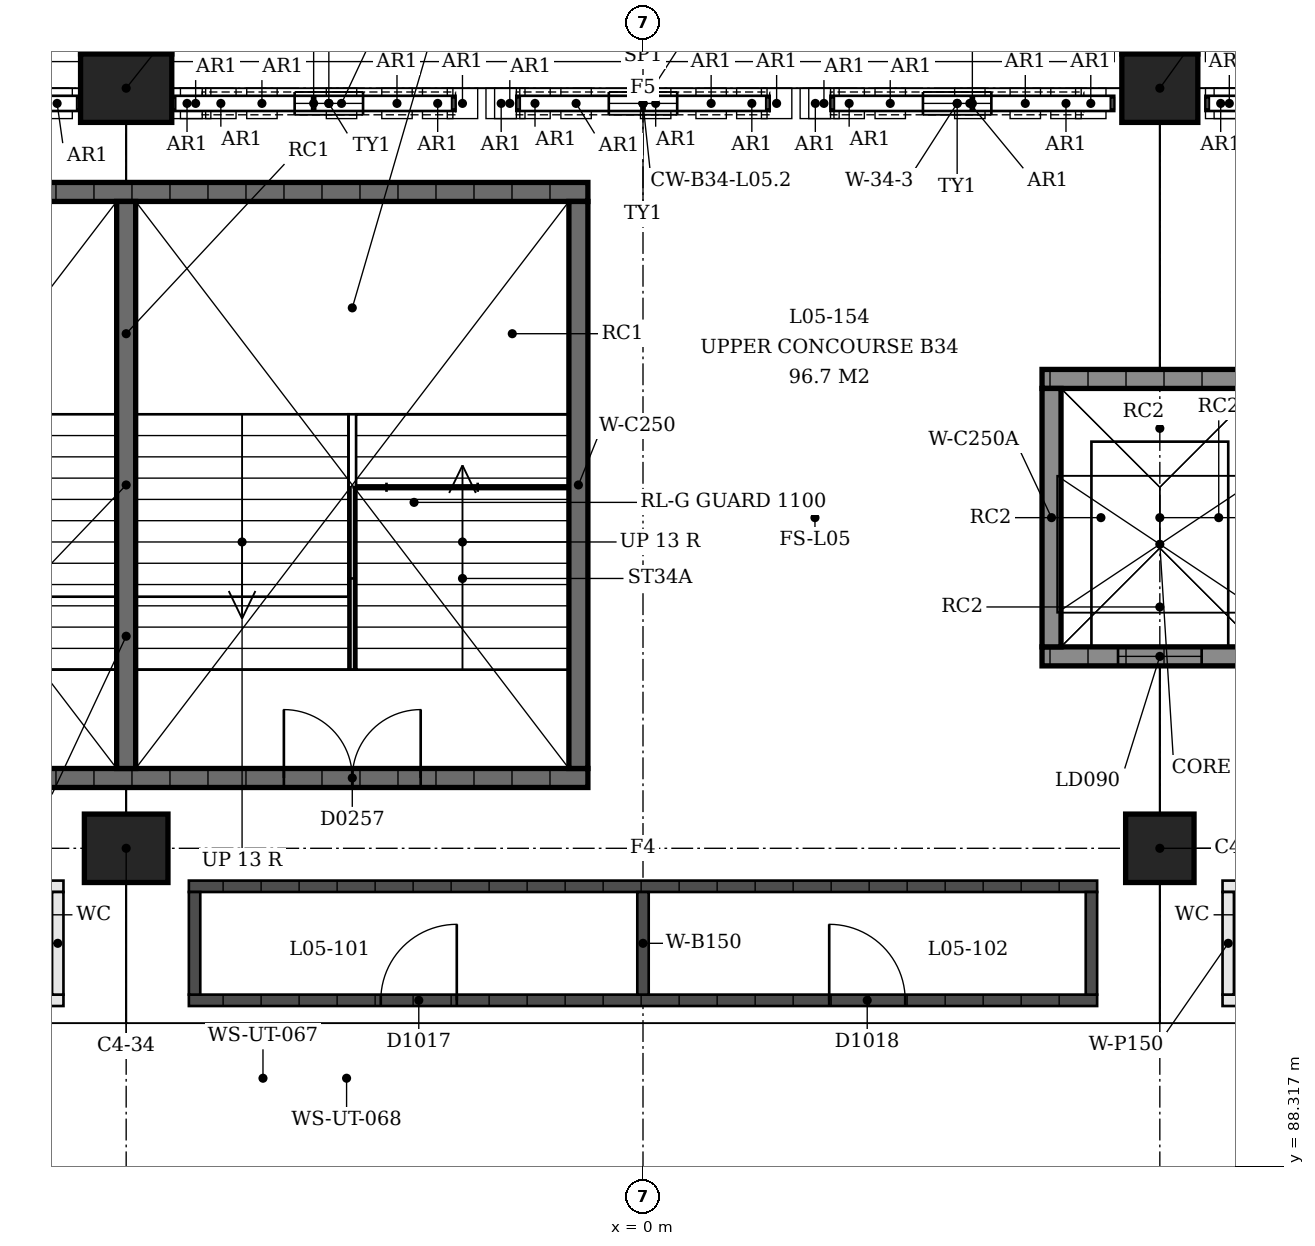
"""IFC4 building model, lengths in metres.
Left out: names, types, materials, properties, quantities, classifications, styles, units other than length and angle.
Written with IfcOpenShell. Run it as: python <this file> out.ifc"""

import sys

from ifc_helpers import new_model, si_unit, direction, frame, frame_2d, origin, origin_2d, place, context, subcontext, project, spatial, polyline, rectangle, outline, extrude, element, fill, save


model = new_model("IFC4")
c1 = context("Model", 3, precision=1e-05, world=origin(), true_north=direction((0.0, 1.0)))
c2 = subcontext(c1, "Body", "Model", "MODEL_VIEW")
j1 = project(units=[si_unit("LENGTHUNIT", "METRE"), si_unit("PLANEANGLEUNIT", "RADIAN")], contexts=[c1])
p1 = place(None, origin())
s1 = spatial("IfcSite", under=j1, at=p1, CompositionType="ELEMENT")
p2 = place(p1, origin())
s2 = spatial("IfcBuilding", under=s1, at=p2, CompositionType="ELEMENT")
p3 = place(p2, frame((0.0, 0.0, 22.5)))
s3 = spatial("IfcBuildingStorey", under=s2, at=p3, CompositionType="ELEMENT", Elevation=22.5)
p4 = place(p3, frame((-6.8, 92.5, 0.0), z_axis=(0.0, 0.0, 1.0), x_axis=(-1.0, 0.0, 0.0)))
e1 = element("IfcColumn", 1, at=p4, inside=s3, PredefinedType="COLUMN", context=c2, shape_type="SweptSolid", body=[
    extrude(rectangle(XDim=1.1, YDim=0.9, at=origin_2d()), origin(), (0.0, 0.0, 1.0), 6.5),
])
p5 = place(p3, frame((-6.8, 102.5, 0.0), z_axis=(0.0, 0.0, 1.0), x_axis=(-1.0, 0.0, 0.0)))
e2 = element("IfcColumn", 2, at=p5, inside=s3, PredefinedType="COLUMN", context=c2, shape_type="SweptSolid", body=[
    extrude(rectangle(XDim=1.2, YDim=0.9, at=origin_2d()), origin(), (0.0, 0.0, 1.0), 6.5),
])
p6 = place(p3, frame((6.8, 92.5, 0.0), z_axis=(0.0, 0.0, 1.0), x_axis=(-1.0, 0.0, 0.0)))
e3 = element("IfcColumn", 3, at=p6, inside=s3, PredefinedType="COLUMN", context=c2, shape_type="SweptSolid", body=[
    extrude(rectangle(XDim=0.9, YDim=0.9, at=origin_2d()), origin(), (0.0, 0.0, 1.0), 6.5),
])
p7 = place(p3, frame((6.8, 102.5, 0.0), z_axis=(0.0, 0.0, 1.0), x_axis=(-1.0, 0.0, 0.0)))
e4 = element("IfcColumn", 4, at=p7, inside=s3, PredefinedType="COLUMN", context=c2, shape_type="SweptSolid", body=[
    extrude(rectangle(XDim=1.0, YDim=0.9, at=origin_2d()), origin(), (0.0, 0.0, 1.0), 6.5),
])
p8 = place(p3, frame((-5.8, 102.3, 4.1), z_axis=(0.0, 0.0, 1.0), x_axis=(1.0, 0.0, 0.0)))
e5 = element("IfcWall", 5, at=p8, inside=s3, PredefinedType="SOLIDWALL", context=c2, shape_type="SweptSolid", body=[
    extrude(outline(polyline([(0.0, 0.0), (3.333, 0.0), (3.333, 0.05), (3.225, 1.288), (2.905, 2.541), (2.38, 3.722), (1.667, 4.8), (0.953, 3.722), (0.428, 2.541), (0.108, 1.288), (0.0, 0.05), (0.0, 0.0)])), frame((0.0, 0.15, 0.0), z_axis=(0.0, -1.0, 0.0), x_axis=(1.0, 0.0, 0.0)), (0.0, 0.0, 1.0), 0.3),
])
p9 = place(p8, frame((1.217, 0.0, 0.4)))
e6 = element("IfcOpeningElement", 6, at=p9, cuts=e5, PredefinedType="OPENING", context=c2, shape_type="SweptSolid", body=[
    extrude(rectangle(XDim=0.9, YDim=3.6, at=frame_2d((0.45, 1.8))), frame((0.0, 0.16, 0.0), z_axis=(0.0, -1.0, 0.0), x_axis=(1.0, 0.0, 0.0)), (0.0, 0.0, 1.0), 0.32),
])
p10 = place(p3, frame((-1.667, 102.3, 4.1), z_axis=(0.0, 0.0, 1.0), x_axis=(1.0, 0.0, 0.0)))
e7 = element("IfcWall", 7, at=p10, inside=s3, PredefinedType="SOLIDWALL", context=c2, shape_type="SweptSolid", body=[
    extrude(outline(polyline([(0.0, 0.0), (3.333, 0.0), (3.333, 0.05), (3.225, 1.288), (2.905, 2.541), (2.38, 3.722), (1.667, 4.8), (0.953, 3.722), (0.428, 2.541), (0.108, 1.288), (0.0, 0.05), (0.0, 0.0)])), frame((0.0, 0.15, 0.0), z_axis=(0.0, -1.0, 0.0), x_axis=(1.0, 0.0, 0.0)), (0.0, 0.0, 1.0), 0.3),
])
p11 = place(p10, frame((1.217, 0.0, 0.4)))
e8 = element("IfcOpeningElement", 8, at=p11, cuts=e7, PredefinedType="OPENING", context=c2, shape_type="SweptSolid", body=[
    extrude(rectangle(XDim=0.9, YDim=3.6, at=frame_2d((0.45, 1.8))), frame((0.0, 0.16, 0.0), z_axis=(0.0, -1.0, 0.0), x_axis=(1.0, 0.0, 0.0)), (0.0, 0.0, 1.0), 0.32),
])
p12 = place(p3, frame((2.467, 102.3, 4.1), z_axis=(0.0, 0.0, 1.0), x_axis=(1.0, 0.0, 0.0)))
e9 = element("IfcWall", 9, at=p12, inside=s3, PredefinedType="SOLIDWALL", context=c2, shape_type="SweptSolid", body=[
    extrude(outline(polyline([(0.0, 0.0), (3.333, 0.0), (3.333, 0.05), (3.225, 1.288), (2.905, 2.541), (2.38, 3.722), (1.667, 4.8), (0.953, 3.722), (0.428, 2.541), (0.108, 1.288), (0.0, 0.05), (0.0, 0.0)])), frame((0.0, 0.15, 0.0), z_axis=(0.0, -1.0, 0.0), x_axis=(1.0, 0.0, 0.0)), (0.0, 0.0, 1.0), 0.3),
])
p13 = place(p12, frame((1.217, 0.0, 0.4)))
e10 = element("IfcOpeningElement", 10, at=p13, cuts=e9, PredefinedType="OPENING", context=c2, shape_type="SweptSolid", body=[
    extrude(rectangle(XDim=0.9, YDim=3.6, at=frame_2d((0.45, 1.8))), frame((0.0, 0.16, 0.0), z_axis=(0.0, -1.0, 0.0), x_axis=(1.0, 0.0, 0.0)), (0.0, 0.0, 1.0), 0.32),
])
p14 = place(p3, frame((-0.725, 93.425, 0.0), z_axis=(0.0, 0.0, 1.0), x_axis=(-1.0, 0.0, 0.0)))
e11 = element("IfcWall", 11, at=p14, inside=s3, PredefinedType="SHEAR", context=c2, shape_type="SweptSolid", body=[
    extrude(rectangle(XDim=12.15, YDim=0.25, at=frame_2d((6.075, 0.0))), origin(), (0.0, 0.0, 1.0), 2.1),
])
p15 = place(p14, frame((2.2, 0.0, 0.0)))
e12 = element("IfcOpeningElement", 12, at=p15, cuts=e11, PredefinedType="OPENING", context=c2, shape_type="SweptSolid", body=[
    extrude(rectangle(XDim=1.8, YDim=2.1, at=frame_2d((0.9, 1.05))), frame((0.0, 0.125, 0.0), z_axis=(0.0, -1.0, 0.0), x_axis=(1.0, 0.0, 0.0)), (0.0, 0.0, 1.0), 0.25),
])
p16 = place(p14, frame((8.15, 0.0, 0.0)))
e13 = element("IfcOpeningElement", 13, at=p16, cuts=e11, PredefinedType="OPENING", context=c2, shape_type="SweptSolid", body=[
    extrude(rectangle(XDim=1.8, YDim=2.1, at=frame_2d((0.9, 1.05))), frame((0.0, 0.125, 0.0), z_axis=(0.0, -1.0, 0.0), x_axis=(1.0, 0.0, 0.0)), (0.0, 0.0, 1.0), 0.25),
])
p17 = place(p3, frame((-0.725, 101.135, 0.0), z_axis=(0.0, 0.0, 1.0), x_axis=(-1.0, 0.0, 0.0)))
e14 = element("IfcWall", 14, at=p17, inside=s3, PredefinedType="SHEAR", context=c2, shape_type="SweptSolid", body=[
    extrude(rectangle(XDim=12.15, YDim=0.25, at=frame_2d((6.075, 0.0))), origin(), (0.0, 0.0, 1.0), 2.1),
])
for number, where, z_axis, x_axis in (
    (15, (-0.85, 93.55, 0.0), (0.0, 0.0, 1.0), (0.0, 1.0, 0.0)),
    (16, (-6.8, 93.55, 0.0), (0.0, 0.0, 1.0), (0.0, 1.0, 0.0)),
):
    element("IfcWall", number, at=place(p3, frame(where, z_axis=z_axis, x_axis=x_axis)), inside=s3, PredefinedType="SHEAR", context=c2, shape_type="SweptSolid", body=[
        extrude(rectangle(XDim=7.46, YDim=0.25, at=frame_2d((3.73, 0.0))), origin(), (0.0, 0.0, 1.0), 2.1),
    ])
p18 = place(p3, frame((8.35, 95.025, 0.0), z_axis=(0.0, 0.0, 1.0), x_axis=(-1.0, 0.0, 0.0)))
e17 = element("IfcWall", 17, at=p18, inside=s3, PredefinedType="SHEAR", context=c2, shape_type="SweptSolid", body=[
    extrude(rectangle(XDim=3.1, YDim=0.25, at=frame_2d((1.55, 0.0))), origin(), (0.0, 0.0, 1.0), 3.4),
])
p19 = place(p18, frame((1.0, 0.0, 0.0)))
e18 = element("IfcOpeningElement", 18, at=p19, cuts=e17, PredefinedType="OPENING", context=c2, shape_type="SweptSolid", body=[
    extrude(rectangle(XDim=1.1, YDim=2.1, at=frame_2d((0.55, 1.05))), frame((0.0, 0.125, 0.0), z_axis=(0.0, -1.0, 0.0), x_axis=(1.0, 0.0, 0.0)), (0.0, 0.0, 1.0), 0.25),
])
p20 = place(p3, frame((8.35, 98.675, 0.0), z_axis=(0.0, 0.0, 1.0), x_axis=(-1.0, 0.0, 0.0)))
e19 = element("IfcWall", 19, at=p20, inside=s3, PredefinedType="SHEAR", context=c2, shape_type="SweptSolid", body=[
    extrude(rectangle(XDim=3.1, YDim=0.25, at=frame_2d((1.55, 0.0))), origin(), (0.0, 0.0, 1.0), 3.4),
])
p21 = place(p3, frame((5.375, 95.15, 0.0), z_axis=(0.0, 0.0, 1.0), x_axis=(0.0, 1.0, 0.0)))
e20 = element("IfcWall", 20, at=p21, inside=s3, PredefinedType="SHEAR", context=c2, shape_type="SweptSolid", body=[
    extrude(rectangle(XDim=3.4, YDim=0.25, at=frame_2d((1.7, 0.0))), origin(), (0.0, 0.0, 1.0), 3.4),
])
p22 = place(p3, frame((-7.625, 90.5, 0.0), z_axis=(0.0, 0.0, 1.0), x_axis=(-1.0, 0.0, 0.0)))
e21 = element("IfcWall", 21, at=p22, inside=s3, PredefinedType="PARTITIONING", context=c2, shape_type="SweptSolid", body=[
    extrude(rectangle(XDim=11.95, YDim=0.15, at=frame_2d((5.975, 0.0))), origin(), (0.0, 0.0, 1.0), 3.0),
])
p23 = place(p22, frame((1.454, 0.0, 0.0)))
e22 = element("IfcOpeningElement", 22, at=p23, cuts=e21, PredefinedType="OPENING", context=c2, shape_type="SweptSolid", body=[
    extrude(rectangle(XDim=0.9, YDim=2.1, at=frame_2d((0.45, 1.05))), frame((0.0, 0.075, 0.0), z_axis=(0.0, -1.0, 0.0), x_axis=(1.0, 0.0, 0.0)), (0.0, 0.0, 1.0), 0.15),
])
p24 = place(p22, frame((5.112, 0.0, 0.0)))
e23 = element("IfcOpeningElement", 23, at=p24, cuts=e21, PredefinedType="OPENING", context=c2, shape_type="SweptSolid", body=[
    extrude(rectangle(XDim=0.9, YDim=2.1, at=frame_2d((0.45, 1.05))), frame((0.0, 0.075, 0.0), z_axis=(0.0, -1.0, 0.0), x_axis=(1.0, 0.0, 0.0)), (0.0, 0.0, 1.0), 0.15),
])
p25 = place(p22, frame((7.962, 0.0, 0.0)))
e24 = element("IfcOpeningElement", 24, at=p25, cuts=e21, PredefinedType="OPENING", context=c2, shape_type="SweptSolid", body=[
    extrude(rectangle(XDim=1.1, YDim=2.1, at=frame_2d((0.55, 1.05))), frame((0.0, 0.075, 0.0), z_axis=(0.0, -1.0, 0.0), x_axis=(1.0, 0.0, 0.0)), (0.0, 0.0, 1.0), 0.15),
])
p26 = place(p22, frame((10.204, 0.0, 0.0)))
e25 = element("IfcOpeningElement", 25, at=p26, cuts=e21, PredefinedType="OPENING", context=c2, shape_type="SweptSolid", body=[
    extrude(rectangle(XDim=1.1, YDim=2.1, at=frame_2d((0.55, 1.05))), frame((0.0, 0.075, 0.0), z_axis=(0.0, -1.0, 0.0), x_axis=(1.0, 0.0, 0.0)), (0.0, 0.0, 1.0), 0.15),
])
p27 = place(p3, frame((-7.625, 92.0, 0.0), z_axis=(0.0, 0.0, 1.0), x_axis=(-1.0, 0.0, 0.0)))
e26 = element("IfcWall", 26, at=p27, inside=s3, PredefinedType="PARTITIONING", context=c2, shape_type="SweptSolid", body=[
    extrude(rectangle(XDim=11.95, YDim=0.15, at=frame_2d((5.975, 0.0))), origin(), (0.0, 0.0, 1.0), 3.0),
])
p28 = place(p3, frame((-7.7, 90.575, 0.0), z_axis=(0.0, 0.0, 1.0), x_axis=(0.0, 1.0, 0.0)))
e27 = element("IfcWall", 27, at=p28, inside=s3, PredefinedType="PARTITIONING", context=c2, shape_type="SweptSolid", body=[
    extrude(rectangle(XDim=1.35, YDim=0.15, at=frame_2d((0.675, 0.0))), origin(), (0.0, 0.0, 1.0), 3.0),
])
p29 = place(p3, frame((-5.975, 90.5, 0.0), z_axis=(0.0, 0.0, 1.0), x_axis=(1.0, 0.0, 0.0)))
e28 = element("IfcWall", 28, at=p29, inside=s3, PredefinedType="SOLIDWALL", context=c2, shape_type="SweptSolid", body=[
    extrude(rectangle(XDim=11.95, YDim=0.15, at=frame_2d((5.975, 0.0))), origin(), (0.0, 0.0, 1.0), 3.0),
])
p30 = place(p29, frame((2.525, 0.0, 0.0)))
e29 = element("IfcOpeningElement", 29, at=p30, cuts=e28, PredefinedType="OPENING", context=c2, shape_type="SweptSolid", body=[
    extrude(rectangle(XDim=1.0, YDim=2.1, at=frame_2d((0.5, 1.05))), frame((0.0, 0.075, 0.0), z_axis=(0.0, -1.0, 0.0), x_axis=(1.0, 0.0, 0.0)), (0.0, 0.0, 1.0), 0.15),
])
p31 = place(p29, frame((8.425, 0.0, 0.0)))
e30 = element("IfcOpeningElement", 30, at=p31, cuts=e28, PredefinedType="OPENING", context=c2, shape_type="SweptSolid", body=[
    extrude(rectangle(XDim=1.0, YDim=2.1, at=frame_2d((0.5, 1.05))), frame((0.0, 0.075, 0.0), z_axis=(0.0, -1.0, 0.0), x_axis=(1.0, 0.0, 0.0)), (0.0, 0.0, 1.0), 0.15),
])
p32 = place(p3, frame((-5.975, 92.0, 0.0), z_axis=(0.0, 0.0, 1.0), x_axis=(1.0, 0.0, 0.0)))
e31 = element("IfcWall", 31, at=p32, inside=s3, PredefinedType="SOLIDWALL", context=c2, shape_type="SweptSolid", body=[
    extrude(rectangle(XDim=11.95, YDim=0.15, at=frame_2d((5.975, 0.0))), origin(), (0.0, 0.0, 1.0), 3.0),
])
for number, where, z_axis, x_axis in (
    (32, (-5.9, 90.575, 0.0), (0.0, 0.0, 1.0), (0.0, 1.0, 0.0)),
    (33, (0.0, 90.575, 0.0), (0.0, 0.0, 1.0), (0.0, 1.0, 0.0)),
    (34, (5.9, 90.575, 0.0), (0.0, 0.0, 1.0), (0.0, 1.0, 0.0)),
):
    element("IfcWall", number, at=place(p3, frame(where, z_axis=z_axis, x_axis=x_axis)), inside=s3, PredefinedType="SOLIDWALL", context=c2, shape_type="SweptSolid", body=[
        extrude(rectangle(XDim=1.35, YDim=0.15, at=frame_2d((0.675, 0.0))), origin(), (0.0, 0.0, 1.0), 3.0),
    ])
p33 = place(p3, frame((19.575, 90.5, 0.0), z_axis=(0.0, 0.0, 1.0), x_axis=(-1.0, 0.0, 0.0)))
e35 = element("IfcWall", 35, at=p33, inside=s3, PredefinedType="PARTITIONING", context=c2, shape_type="SweptSolid", body=[
    extrude(rectangle(XDim=11.95, YDim=0.15, at=frame_2d((5.975, 0.0))), origin(), (0.0, 0.0, 1.0), 3.0),
])
p34 = place(p33, frame((1.454, 0.0, 0.0)))
e36 = element("IfcOpeningElement", 36, at=p34, cuts=e35, PredefinedType="OPENING", context=c2, shape_type="SweptSolid", body=[
    extrude(rectangle(XDim=0.9, YDim=2.1, at=frame_2d((0.45, 1.05))), frame((0.0, 0.075, 0.0), z_axis=(0.0, -1.0, 0.0), x_axis=(1.0, 0.0, 0.0)), (0.0, 0.0, 1.0), 0.15),
])
p35 = place(p33, frame((5.112, 0.0, 0.0)))
e37 = element("IfcOpeningElement", 37, at=p35, cuts=e35, PredefinedType="OPENING", context=c2, shape_type="SweptSolid", body=[
    extrude(rectangle(XDim=0.9, YDim=2.1, at=frame_2d((0.45, 1.05))), frame((0.0, 0.075, 0.0), z_axis=(0.0, -1.0, 0.0), x_axis=(1.0, 0.0, 0.0)), (0.0, 0.0, 1.0), 0.15),
])
p36 = place(p33, frame((7.962, 0.0, 0.0)))
e38 = element("IfcOpeningElement", 38, at=p36, cuts=e35, PredefinedType="OPENING", context=c2, shape_type="SweptSolid", body=[
    extrude(rectangle(XDim=1.1, YDim=2.1, at=frame_2d((0.55, 1.05))), frame((0.0, 0.075, 0.0), z_axis=(0.0, -1.0, 0.0), x_axis=(1.0, 0.0, 0.0)), (0.0, 0.0, 1.0), 0.15),
])
p37 = place(p33, frame((10.204, 0.0, 0.0)))
e39 = element("IfcOpeningElement", 39, at=p37, cuts=e35, PredefinedType="OPENING", context=c2, shape_type="SweptSolid", body=[
    extrude(rectangle(XDim=1.1, YDim=2.1, at=frame_2d((0.55, 1.05))), frame((0.0, 0.075, 0.0), z_axis=(0.0, -1.0, 0.0), x_axis=(1.0, 0.0, 0.0)), (0.0, 0.0, 1.0), 0.15),
])
p38 = place(p3, frame((19.575, 92.0, 0.0), z_axis=(0.0, 0.0, 1.0), x_axis=(-1.0, 0.0, 0.0)))
e40 = element("IfcWall", 40, at=p38, inside=s3, PredefinedType="PARTITIONING", context=c2, shape_type="SweptSolid", body=[
    extrude(rectangle(XDim=11.95, YDim=0.15, at=frame_2d((5.975, 0.0))), origin(), (0.0, 0.0, 1.0), 3.0),
])
p39 = place(p3, frame((7.7, 90.575, 0.0), z_axis=(0.0, 0.0, 1.0), x_axis=(0.0, 1.0, 0.0)))
e41 = element("IfcWall", 41, at=p39, inside=s3, PredefinedType="PARTITIONING", context=c2, shape_type="SweptSolid", body=[
    extrude(rectangle(XDim=1.35, YDim=0.15, at=frame_2d((0.675, 0.0))), origin(), (0.0, 0.0, 1.0), 3.0),
])
p40 = place(p9, origin())
e42 = element("IfcWindow", 42, at=p40, inside=s3, PartitioningType="SINGLE_PANEL", PredefinedType="WINDOW", context=c2, shape_type="SweptSolid", body=[
    extrude(rectangle(XDim=0.9, YDim=3.6, at=frame_2d((0.45, 1.8))), frame((0.0, 0.03, 0.0), z_axis=(0.0, -1.0, 0.0), x_axis=(1.0, 0.0, 0.0)), (0.0, 0.0, 1.0), 0.06),
])
fill(e6, e42)
p41 = place(p11, origin())
e43 = element("IfcWindow", 43, at=p41, inside=s3, PartitioningType="SINGLE_PANEL", PredefinedType="WINDOW", context=c2, shape_type="SweptSolid", body=[
    extrude(rectangle(XDim=0.9, YDim=3.6, at=frame_2d((0.45, 1.8))), frame((0.0, 0.03, 0.0), z_axis=(0.0, -1.0, 0.0), x_axis=(1.0, 0.0, 0.0)), (0.0, 0.0, 1.0), 0.06),
])
fill(e8, e43)
p42 = place(p13, origin())
e44 = element("IfcWindow", 44, at=p42, inside=s3, PartitioningType="SINGLE_PANEL", PredefinedType="WINDOW", context=c2, shape_type="SweptSolid", body=[
    extrude(rectangle(XDim=0.9, YDim=3.6, at=frame_2d((0.45, 1.8))), frame((0.0, 0.03, 0.0), z_axis=(0.0, -1.0, 0.0), x_axis=(1.0, 0.0, 0.0)), (0.0, 0.0, 1.0), 0.06),
])
fill(e10, e44)
p43 = place(p15, origin())
e45 = element("IfcDoor", 45, at=p43, inside=s3, OperationType="DOUBLE_DOOR_SINGLE_SWING", PredefinedType="DOOR", context=c2, shape_type="SweptSolid", body=[
    extrude(rectangle(XDim=1.8, YDim=2.1, at=frame_2d((0.9, 1.05))), frame((0.0, 0.025, 0.0), z_axis=(0.0, -1.0, 0.0), x_axis=(1.0, 0.0, 0.0)), (0.0, 0.0, 1.0), 0.05),
])
fill(e12, e45)
p44 = place(p19, origin())
e46 = element("IfcDoor", 46, at=p44, inside=s3, OperationType="SLIDING_TO_LEFT", PredefinedType="DOOR", context=c2, shape_type="SweptSolid", body=[
    extrude(rectangle(XDim=1.1, YDim=2.1, at=frame_2d((0.55, 1.05))), frame((0.0, 0.025, 0.0), z_axis=(0.0, -1.0, 0.0), x_axis=(1.0, 0.0, 0.0)), (0.0, 0.0, 1.0), 0.05),
])
fill(e18, e46)
p45 = place(p30, origin())
e47 = element("IfcDoor", 47, at=p45, inside=s3, OperationType="SINGLE_SWING_LEFT", PredefinedType="DOOR", context=c2, shape_type="SweptSolid", body=[
    extrude(rectangle(XDim=1.0, YDim=2.1, at=frame_2d((0.5, 1.05))), frame((0.0, 0.025, 0.0), z_axis=(0.0, -1.0, 0.0), x_axis=(1.0, 0.0, 0.0)), (0.0, 0.0, 1.0), 0.05),
])
fill(e29, e47)
p46 = place(p31, origin())
e48 = element("IfcDoor", 48, at=p46, inside=s3, OperationType="SINGLE_SWING_RIGHT", PredefinedType="DOOR", context=c2, shape_type="SweptSolid", body=[
    extrude(rectangle(XDim=1.0, YDim=2.1, at=frame_2d((0.5, 1.05))), frame((0.0, 0.025, 0.0), z_axis=(0.0, -1.0, 0.0), x_axis=(1.0, 0.0, 0.0)), (0.0, 0.0, 1.0), 0.05),
])
fill(e30, e48)
save(model, sys.argv[1])
